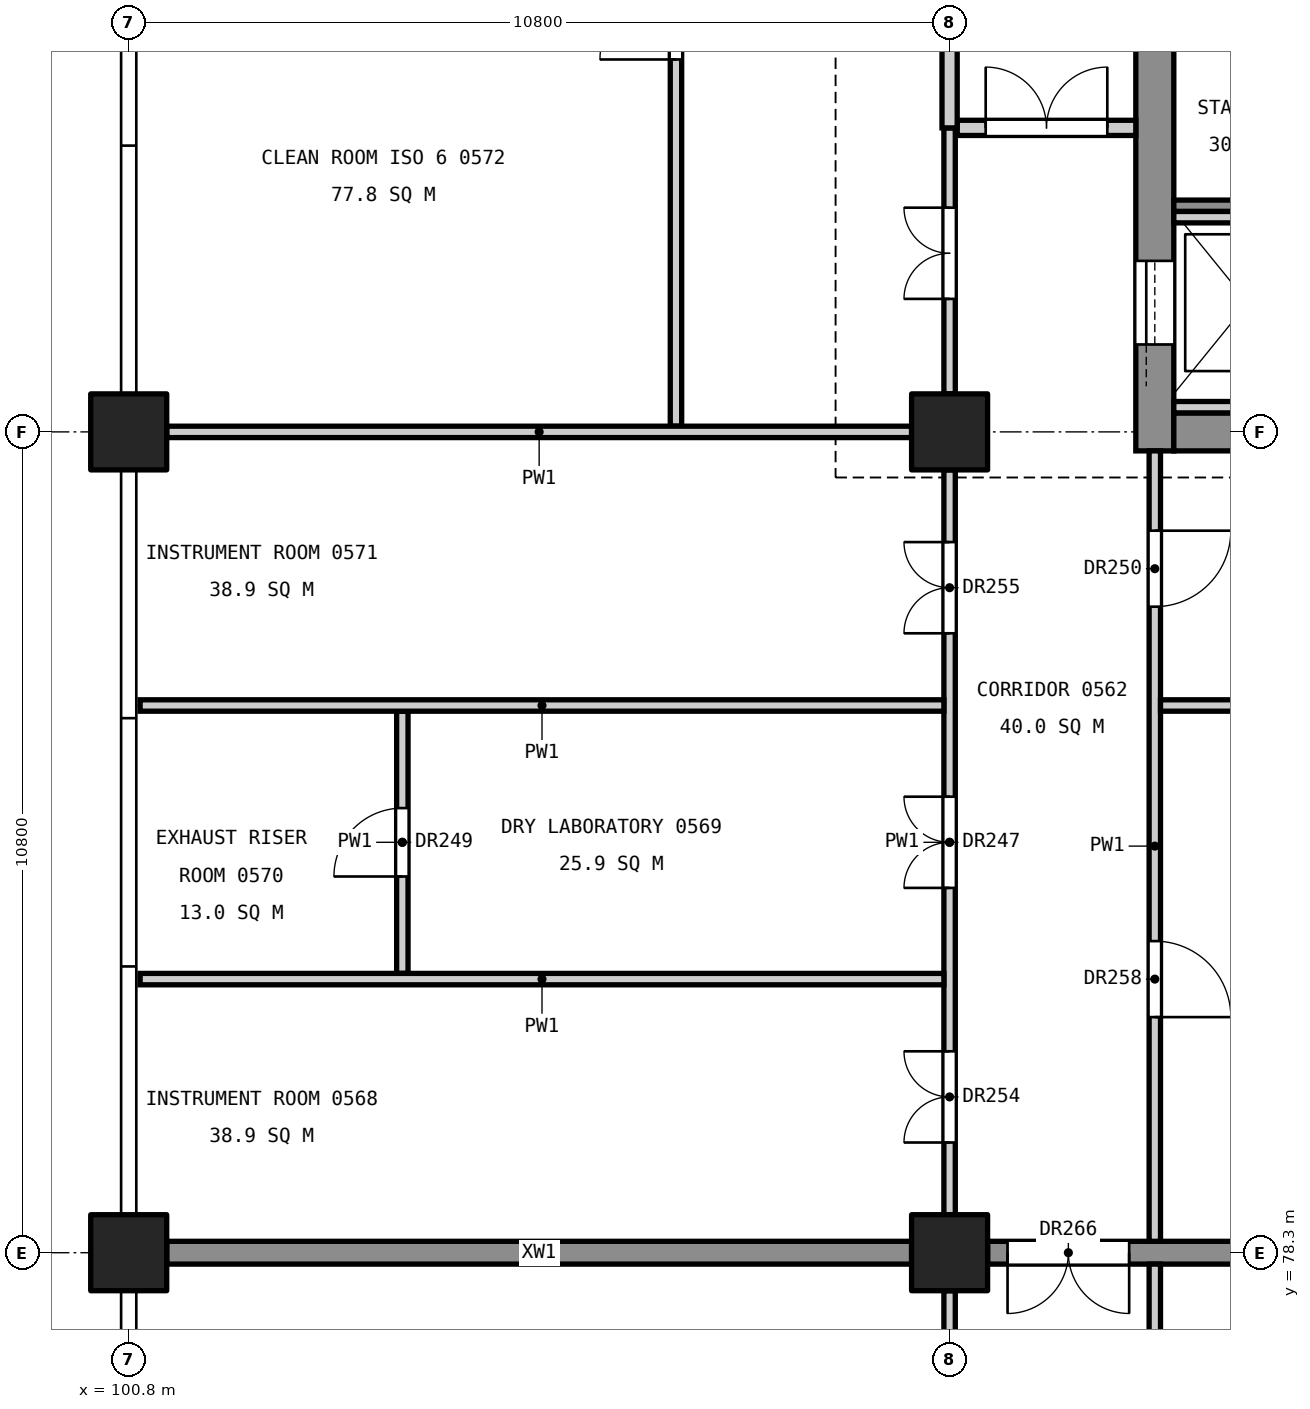
"""IFC4 building model, lengths in metres.
Left out: names, types, materials, properties, quantities, classifications, styles, units other than length and angle.
Written with IfcOpenShell. Run it as: python <this file> out.ifc"""

import sys

from ifc_helpers import new_model, si_unit, direction, frame, frame_2d, origin, origin_2d, place, context, subcontext, project, spatial, rectangle, extrude, element, fill, save


model = new_model("IFC4")
c1 = context("Model", 3, precision=1e-05, world=origin(), true_north=direction((0.0, 1.0)))
c2 = subcontext(c1, "Body", "Model", "MODEL_VIEW")
j1 = project(units=[si_unit("LENGTHUNIT", "METRE"), si_unit("PLANEANGLEUNIT", "RADIAN")], contexts=[c1])
p1 = place(None, origin())
s1 = spatial("IfcSite", under=j1, at=p1, CompositionType="ELEMENT")
p2 = place(p1, origin())
s2 = spatial("IfcBuilding", under=s1, at=p2, CompositionType="ELEMENT")
p3 = place(p2, frame((0.0, 0.0, 27.0)))
s3 = spatial("IfcBuildingStorey", under=s2, at=p3, CompositionType="ELEMENT", Elevation=27.0)
for number, where, z_axis, x_axis in (
    (1, (111.6, 78.3, 0.0), (0.0, 0.0, 1.0), (1.0, 0.0, 0.0)),
    (2, (111.6, 89.1, 0.0), (0.0, 0.0, 1.0), (1.0, 0.0, 0.0)),
    (3, (100.8, 78.3, 0.0), (0.0, 0.0, 1.0), (1.0, 0.0, 0.0)),
    (4, (100.8, 89.1, 0.0), (0.0, 0.0, 1.0), (1.0, 0.0, 0.0)),
):
    element("IfcColumn", number, at=place(p3, frame(where, z_axis=z_axis, x_axis=x_axis)), inside=s3, PredefinedType="COLUMN", context=c2, shape_type="SweptSolid", body=[
        extrude(rectangle(XDim=1.0, YDim=1.0, at=origin_2d()), origin(), (0.0, 0.0, 1.0), 4.8),
    ])
p4 = place(p3, frame((114.3, 88.85, 0.0), z_axis=(0.0, 0.0, 1.0), x_axis=(0.0, 1.0, 0.0)))
e5 = element("IfcWall", 5, at=p4, inside=s3, PredefinedType="SHEAR", context=c2, shape_type="SweptSolid", body=[
    extrude(rectangle(XDim=11.3, YDim=0.5, at=frame_2d((5.65, 0.0))), origin(), (0.0, 0.0, 1.0), 4.55),
])
p5 = place(p4, frame((9.35, 0.0, 0.0)))
e6 = element("IfcOpeningElement", 6, at=p5, cuts=e5, PredefinedType="OPENING", context=c2, shape_type="SweptSolid", body=[
    extrude(rectangle(XDim=1.4, YDim=2.1, at=frame_2d((0.7, 1.05))), frame((0.0, 0.26, 0.0), z_axis=(0.0, -1.0, 0.0), x_axis=(1.0, 0.0, 0.0)), (0.0, 0.0, 1.0), 0.52),
])
p6 = place(p4, frame((1.4, 0.0, 0.0)))
e7 = element("IfcOpeningElement", 7, at=p6, cuts=e5, PredefinedType="OPENING", context=c2, shape_type="SweptSolid", body=[
    extrude(rectangle(XDim=1.1, YDim=2.1, at=frame_2d((0.55, 1.05))), frame((0.0, 0.26, 0.0), z_axis=(0.0, -1.0, 0.0), x_axis=(1.0, 0.0, 0.0)), (0.0, 0.0, 1.0), 0.52),
])
p7 = place(p3, frame((118.55, 89.1, 0.0), z_axis=(0.0, 0.0, 1.0), x_axis=(-1.0, 0.0, 0.0)))
e8 = element("IfcWall", 8, at=p7, inside=s3, PredefinedType="SHEAR", context=c2, shape_type="SweptSolid", body=[
    extrude(rectangle(XDim=4.0, YDim=0.5, at=frame_2d((2.0, 0.0))), origin(), (0.0, 0.0, 1.0), 4.55),
])
p8 = place(p3, frame((118.3, 78.3, 0.0), z_axis=(0.0, 0.0, 1.0), x_axis=(-1.0, 0.0, 0.0)))
e9 = element("IfcWall", 9, at=p8, inside=s3, PredefinedType="SHEAR", context=c2, shape_type="SweptSolid", body=[
    extrude(rectangle(XDim=6.2, YDim=0.3, at=frame_2d((3.1, 0.0))), origin(), (0.0, 0.0, 1.0), 4.55),
])
p9 = place(p8, frame((4.337, 0.0, 0.0)))
e10 = element("IfcOpeningElement", 10, at=p9, cuts=e9, PredefinedType="OPENING", context=c2, shape_type="SweptSolid", body=[
    extrude(rectangle(XDim=1.6, YDim=2.1, at=frame_2d((0.8, 1.05))), frame((0.0, 0.16, 0.0), z_axis=(0.0, -1.0, 0.0), x_axis=(1.0, 0.0, 0.0)), (0.0, 0.0, 1.0), 0.32),
])
p10 = place(p3, frame((111.1, 78.3, 0.0), z_axis=(0.0, 0.0, 1.0), x_axis=(-1.0, 0.0, 0.0)))
e11 = element("IfcWall", 11, at=p10, inside=s3, PredefinedType="SHEAR", context=c2, shape_type="SweptSolid", body=[
    extrude(rectangle(XDim=9.8, YDim=0.3, at=frame_2d((4.9, 0.0))), origin(), (0.0, 0.0, 1.0), 4.55),
])
p11 = place(p3, frame((118.55, 92.075, 0.0), z_axis=(0.0, 0.0, 1.0), x_axis=(-1.0, 0.0, 0.0)))
e12 = element("IfcWall", 12, at=p11, inside=s3, PredefinedType="SOLIDWALL", context=c2, shape_type="SweptSolid", body=[
    extrude(rectangle(XDim=4.0, YDim=0.15, at=frame_2d((2.0, 0.0))), origin(), (0.0, 0.0, 1.0), 4.55),
])
for number, where, z_axis, x_axis in (
    (13, (116.35, 91.925, 0.0), (0.0, 0.0, 1.0), (-1.0, 0.0, 0.0)),
    (14, (116.35, 89.425, 0.0), (0.0, 0.0, 1.0), (-1.0, 0.0, 0.0)),
):
    element("IfcWall", number, at=place(p3, frame(where, z_axis=z_axis, x_axis=x_axis)), inside=s3, PredefinedType="SOLIDWALL", context=c2, shape_type="SweptSolid", body=[
        extrude(rectangle(XDim=1.8, YDim=0.15, at=frame_2d((0.9, 0.0))), origin(), (0.0, 0.0, 1.0), 4.8),
    ])
p12 = place(p3, frame((114.3, 74.95, 0.0), z_axis=(0.0, 0.0, 1.0), x_axis=(0.0, 1.0, 0.0)))
e15 = element("IfcWall", 15, at=p12, inside=s3, PredefinedType="PARTITIONING", context=c2, shape_type="SweptSolid", body=[
    extrude(rectangle(XDim=3.2, YDim=0.15, at=frame_2d((1.6, 0.0))), origin(), (0.0, 0.0, 1.0), 3.55),
])
p13 = place(p12, frame((1.05, 0.0, 0.0)))
e16 = element("IfcOpeningElement", 16, at=p13, cuts=e15, PredefinedType="OPENING", context=c2, shape_type="SweptSolid", body=[
    extrude(rectangle(XDim=1.0, YDim=2.1, at=frame_2d((0.5, 1.05))), frame((0.0, 0.085, 0.0), z_axis=(0.0, -1.0, 0.0), x_axis=(1.0, 0.0, 0.0)), (0.0, 0.0, 1.0), 0.17),
])
p14 = place(p3, frame((114.3, 78.45, 0.0), z_axis=(0.0, 0.0, 1.0), x_axis=(0.0, 1.0, 0.0)))
e17 = element("IfcWall", 17, at=p14, inside=s3, PredefinedType="PARTITIONING", context=c2, shape_type="SweptSolid", body=[
    extrude(rectangle(XDim=10.4, YDim=0.15, at=frame_2d((5.2, 0.0))), origin(), (0.0, 0.0, 1.0), 3.55),
])
p15 = place(p14, frame((8.35, 0.0, 0.0)))
e18 = element("IfcOpeningElement", 18, at=p15, cuts=e17, PredefinedType="OPENING", context=c2, shape_type="SweptSolid", body=[
    extrude(rectangle(XDim=1.0, YDim=2.1, at=frame_2d((0.5, 1.05))), frame((0.0, 0.085, 0.0), z_axis=(0.0, -1.0, 0.0), x_axis=(1.0, 0.0, 0.0)), (0.0, 0.0, 1.0), 0.17),
])
p16 = place(p14, frame((2.95, 0.0, 0.0)))
e19 = element("IfcOpeningElement", 19, at=p16, cuts=e17, PredefinedType="OPENING", context=c2, shape_type="SweptSolid", body=[
    extrude(rectangle(XDim=1.0, YDim=2.1, at=frame_2d((0.5, 1.05))), frame((0.0, 0.085, 0.0), z_axis=(0.0, -1.0, 0.0), x_axis=(1.0, 0.0, 0.0)), (0.0, 0.0, 1.0), 0.17),
])
p17 = place(p3, frame((118.65, 85.5, 0.0), z_axis=(0.0, 0.0, 1.0), x_axis=(-1.0, 0.0, 0.0)))
e20 = element("IfcWall", 20, at=p17, inside=s3, PredefinedType="PARTITIONING", context=c2, shape_type="SweptSolid", body=[
    extrude(rectangle(XDim=4.275, YDim=0.15, at=frame_2d((2.137, 0.0))), origin(), (0.0, 0.0, 1.0), 3.85),
])
p18 = place(p3, frame((114.05, 93.1, 0.0), z_axis=(0.0, 0.0, 1.0), x_axis=(-1.0, 0.0, 0.0)))
e21 = element("IfcWall", 21, at=p18, inside=s3, PredefinedType="PARTITIONING", context=c2, shape_type="SweptSolid", body=[
    extrude(rectangle(XDim=2.35, YDim=0.2, at=frame_2d((1.175, 0.0))), origin(), (0.0, 0.0, 1.0), 3.55),
])
p19 = place(p18, frame((0.375, 0.0, 0.0)))
e22 = element("IfcOpeningElement", 22, at=p19, cuts=e21, PredefinedType="OPENING", context=c2, shape_type="SweptSolid", body=[
    extrude(rectangle(XDim=1.6, YDim=2.1, at=frame_2d((0.8, 1.05))), frame((0.0, 0.11, 0.0), z_axis=(0.0, -1.0, 0.0), x_axis=(1.0, 0.0, 0.0)), (0.0, 0.0, 1.0), 0.22),
])
p20 = place(p3, frame((111.6, 70.8, 0.0), z_axis=(0.0, 0.0, 1.0), x_axis=(0.0, 1.0, 0.0)))
e23 = element("IfcWall", 23, at=p20, inside=s3, PredefinedType="PARTITIONING", context=c2, shape_type="SweptSolid", body=[
    extrude(rectangle(XDim=7.0, YDim=0.15, at=frame_2d((3.5, 0.0))), origin(), (0.0, 0.0, 1.0), 3.55),
])
p21 = place(p20, frame((2.9, 0.0, 0.0)))
e24 = element("IfcOpeningElement", 24, at=p21, cuts=e23, PredefinedType="OPENING", context=c2, shape_type="SweptSolid", body=[
    extrude(rectangle(XDim=1.2, YDim=2.1, at=frame_2d((0.6, 1.05))), frame((0.0, 0.085, 0.0), z_axis=(0.0, -1.0, 0.0), x_axis=(1.0, 0.0, 0.0)), (0.0, 0.0, 1.0), 0.17),
])
p22 = place(p3, frame((111.6, 78.8, 0.0), z_axis=(0.0, 0.0, 1.0), x_axis=(0.0, 1.0, 0.0)))
e25 = element("IfcWall", 25, at=p22, inside=s3, PredefinedType="PARTITIONING", context=c2, shape_type="SweptSolid", body=[
    extrude(rectangle(XDim=9.8, YDim=0.15, at=frame_2d((4.9, 0.0))), origin(), (0.0, 0.0, 1.0), 3.55),
])
p23 = place(p22, frame((4.3, 0.0, 0.0)))
e26 = element("IfcOpeningElement", 26, at=p23, cuts=e25, PredefinedType="OPENING", context=c2, shape_type="SweptSolid", body=[
    extrude(rectangle(XDim=1.2, YDim=2.1, at=frame_2d((0.6, 1.05))), frame((0.0, 0.085, 0.0), z_axis=(0.0, -1.0, 0.0), x_axis=(1.0, 0.0, 0.0)), (0.0, 0.0, 1.0), 0.17),
])
p24 = place(p22, frame((0.95, 0.0, 0.0)))
e27 = element("IfcOpeningElement", 27, at=p24, cuts=e25, PredefinedType="OPENING", context=c2, shape_type="SweptSolid", body=[
    extrude(rectangle(XDim=1.2, YDim=2.1, at=frame_2d((0.6, 1.05))), frame((0.0, 0.085, 0.0), z_axis=(0.0, -1.0, 0.0), x_axis=(1.0, 0.0, 0.0)), (0.0, 0.0, 1.0), 0.17),
])
p25 = place(p22, frame((7.65, 0.0, 0.0)))
e28 = element("IfcOpeningElement", 28, at=p25, cuts=e25, PredefinedType="OPENING", context=c2, shape_type="SweptSolid", body=[
    extrude(rectangle(XDim=1.2, YDim=2.1, at=frame_2d((0.6, 1.05))), frame((0.0, 0.085, 0.0), z_axis=(0.0, -1.0, 0.0), x_axis=(1.0, 0.0, 0.0)), (0.0, 0.0, 1.0), 0.17),
])
p26 = place(p3, frame((111.6, 89.6, 0.0), z_axis=(0.0, 0.0, 1.0), x_axis=(0.0, 1.0, 0.0)))
e29 = element("IfcWall", 29, at=p26, inside=s3, PredefinedType="PARTITIONING", context=c2, shape_type="SweptSolid", body=[
    extrude(rectangle(XDim=3.5, YDim=0.15, at=frame_2d((1.75, 0.0))), origin(), (0.0, 0.0, 1.0), 3.55),
])
p27 = place(p26, frame((1.25, 0.0, 0.0)))
e30 = element("IfcOpeningElement", 30, at=p27, cuts=e29, PredefinedType="OPENING", context=c2, shape_type="SweptSolid", body=[
    extrude(rectangle(XDim=1.2, YDim=2.1, at=frame_2d((0.6, 1.05))), frame((0.0, 0.085, 0.0), z_axis=(0.0, -1.0, 0.0), x_axis=(1.0, 0.0, 0.0)), (0.0, 0.0, 1.0), 0.17),
])
p28 = place(p3, frame((111.6, 93.1, 0.0), z_axis=(0.0, 0.0, 1.0), x_axis=(0.0, 1.0, 0.0)))
e31 = element("IfcWall", 31, at=p28, inside=s3, PredefinedType="PARTITIONING", context=c2, shape_type="SweptSolid", body=[
    extrude(rectangle(XDim=6.3, YDim=0.2, at=frame_2d((3.15, 0.0))), origin(), (0.0, 0.0, 1.0), 3.55),
])
p29 = place(p3, frame((104.4, 81.975, 0.0), z_axis=(0.0, 0.0, 1.0), x_axis=(0.0, 1.0, 0.0)))
e32 = element("IfcWall", 32, at=p29, inside=s3, PredefinedType="PARTITIONING", context=c2, shape_type="SweptSolid", body=[
    extrude(rectangle(XDim=3.45, YDim=0.15, at=frame_2d((1.725, 0.0))), origin(), (0.0, 0.0, 1.0), 3.55),
])
p30 = place(p29, frame((1.275, 0.0, 0.0)))
e33 = element("IfcOpeningElement", 33, at=p30, cuts=e32, PredefinedType="OPENING", context=c2, shape_type="SweptSolid", body=[
    extrude(rectangle(XDim=0.9, YDim=2.1, at=frame_2d((0.45, 1.05))), frame((0.0, 0.085, 0.0), z_axis=(0.0, -1.0, 0.0), x_axis=(1.0, 0.0, 0.0)), (0.0, 0.0, 1.0), 0.17),
])
p31 = place(p3, frame((108.0, 89.175, 0.0), z_axis=(0.0, 0.0, 1.0), x_axis=(0.0, 1.0, 0.0)))
e34 = element("IfcWall", 34, at=p31, inside=s3, PredefinedType="PARTITIONING", context=c2, shape_type="SweptSolid", body=[
    extrude(rectangle(XDim=10.575, YDim=0.15, at=frame_2d((5.288, 0.0))), origin(), (0.0, 0.0, 1.0), 3.55),
])
p32 = place(p31, frame((4.825, 0.0, 0.0)))
e35 = element("IfcOpeningElement", 35, at=p32, cuts=e34, PredefinedType="OPENING", context=c2, shape_type="SweptSolid", body=[
    extrude(rectangle(XDim=1.0, YDim=2.1, at=frame_2d((0.5, 1.05))), frame((0.0, 0.085, 0.0), z_axis=(0.0, -1.0, 0.0), x_axis=(1.0, 0.0, 0.0)), (0.0, 0.0, 1.0), 0.17),
])
for number, where, z_axis, x_axis in (
    (36, (111.525, 81.9, 0.0), (0.0, 0.0, 1.0), (-1.0, 0.0, 0.0)),
    (37, (111.525, 85.5, 0.0), (0.0, 0.0, 1.0), (-1.0, 0.0, 0.0)),
):
    element("IfcWall", number, at=place(p3, frame(where, z_axis=z_axis, x_axis=x_axis)), inside=s3, PredefinedType="PARTITIONING", context=c2, shape_type="SweptSolid", body=[
        extrude(rectangle(XDim=10.575, YDim=0.15, at=frame_2d((5.288, 0.0))), origin(), (0.0, 0.0, 1.0), 3.85),
    ])
p33 = place(p3, frame((111.1, 89.1, 0.0), z_axis=(0.0, 0.0, 1.0), x_axis=(-1.0, 0.0, 0.0)))
e38 = element("IfcWall", 38, at=p33, inside=s3, PredefinedType="PARTITIONING", context=c2, shape_type="SweptSolid", body=[
    extrude(rectangle(XDim=9.8, YDim=0.15, at=frame_2d((4.9, 0.0))), origin(), (0.0, 0.0, 1.0), 3.85),
])
p34 = place(p6, origin())
e39 = element("IfcDoor", 39, at=p34, inside=s3, OperationType="SLIDING_TO_LEFT", PredefinedType="DOOR", context=c2, shape_type="SweptSolid", body=[
    extrude(rectangle(XDim=1.1, YDim=2.1, at=frame_2d((0.55, 1.05))), frame((0.0, 0.025, 0.0), z_axis=(0.0, -1.0, 0.0), x_axis=(1.0, 0.0, 0.0)), (0.0, 0.0, 1.0), 0.05),
])
fill(e7, e39)
p35 = place(p32, origin())
e40 = element("IfcDoor", 40, at=p35, inside=s3, OperationType="SINGLE_SWING_LEFT", PredefinedType="DOOR", context=c2, shape_type="SweptSolid", body=[
    extrude(rectangle(XDim=1.0, YDim=2.1, at=frame_2d((0.5, 1.05))), frame((0.0, 0.025, 0.0), z_axis=(0.0, -1.0, 0.0), x_axis=(1.0, 0.0, 0.0)), (0.0, 0.0, 1.0), 0.05),
])
fill(e35, e40)
p36 = place(p23, origin())
e41 = element("IfcDoor", 41, at=p36, inside=s3, OperationType="DOUBLE_DOOR_SINGLE_SWING", PredefinedType="DOOR", context=c2, shape_type="SweptSolid", body=[
    extrude(rectangle(XDim=1.2, YDim=2.1, at=frame_2d((0.6, 1.05))), frame((0.0, 0.025, 0.0), z_axis=(0.0, -1.0, 0.0), x_axis=(1.0, 0.0, 0.0)), (0.0, 0.0, 1.0), 0.05),
])
fill(e26, e41)
p37 = place(p30, origin())
e42 = element("IfcDoor", 42, at=p37, inside=s3, OperationType="SINGLE_SWING_LEFT", PredefinedType="DOOR", context=c2, shape_type="SweptSolid", body=[
    extrude(rectangle(XDim=0.9, YDim=2.1, at=frame_2d((0.45, 1.05))), frame((0.0, 0.025, 0.0), z_axis=(0.0, -1.0, 0.0), x_axis=(1.0, 0.0, 0.0)), (0.0, 0.0, 1.0), 0.05),
])
fill(e33, e42)
p38 = place(p15, frame((1.0, 0.0, 0.0), z_axis=(0.0, 0.0, 1.0), x_axis=(-1.0, 0.0, 0.0)))
e43 = element("IfcDoor", 43, at=p38, inside=s3, OperationType="SINGLE_SWING_LEFT", PredefinedType="DOOR", context=c2, shape_type="SweptSolid", body=[
    extrude(rectangle(XDim=1.0, YDim=2.1, at=frame_2d((0.5, 1.05))), frame((0.0, 0.025, 0.0), z_axis=(0.0, -1.0, 0.0), x_axis=(1.0, 0.0, 0.0)), (0.0, 0.0, 1.0), 0.05),
])
fill(e18, e43)
p39 = place(p27, origin())
e44 = element("IfcDoor", 44, at=p39, inside=s3, OperationType="DOUBLE_DOOR_SINGLE_SWING", PredefinedType="DOOR", context=c2, shape_type="SweptSolid", body=[
    extrude(rectangle(XDim=1.2, YDim=2.1, at=frame_2d((0.6, 1.05))), frame((0.0, 0.025, 0.0), z_axis=(0.0, -1.0, 0.0), x_axis=(1.0, 0.0, 0.0)), (0.0, 0.0, 1.0), 0.05),
])
fill(e30, e44)
p40 = place(p24, origin())
e45 = element("IfcDoor", 45, at=p40, inside=s3, OperationType="DOUBLE_DOOR_SINGLE_SWING", PredefinedType="DOOR", context=c2, shape_type="SweptSolid", body=[
    extrude(rectangle(XDim=1.2, YDim=2.1, at=frame_2d((0.6, 1.05))), frame((0.0, 0.025, 0.0), z_axis=(0.0, -1.0, 0.0), x_axis=(1.0, 0.0, 0.0)), (0.0, 0.0, 1.0), 0.05),
])
fill(e27, e45)
p41 = place(p25, origin())
e46 = element("IfcDoor", 46, at=p41, inside=s3, OperationType="DOUBLE_DOOR_SINGLE_SWING", PredefinedType="DOOR", context=c2, shape_type="SweptSolid", body=[
    extrude(rectangle(XDim=1.2, YDim=2.1, at=frame_2d((0.6, 1.05))), frame((0.0, 0.025, 0.0), z_axis=(0.0, -1.0, 0.0), x_axis=(1.0, 0.0, 0.0)), (0.0, 0.0, 1.0), 0.05),
])
fill(e28, e46)
p42 = place(p16, frame((1.0, 0.0, 0.0), z_axis=(0.0, 0.0, 1.0), x_axis=(-1.0, 0.0, 0.0)))
e47 = element("IfcDoor", 47, at=p42, inside=s3, OperationType="SINGLE_SWING_RIGHT", PredefinedType="DOOR", context=c2, shape_type="SweptSolid", body=[
    extrude(rectangle(XDim=1.0, YDim=2.1, at=frame_2d((0.5, 1.05))), frame((0.0, 0.025, 0.0), z_axis=(0.0, -1.0, 0.0), x_axis=(1.0, 0.0, 0.0)), (0.0, 0.0, 1.0), 0.05),
])
fill(e19, e47)
p43 = place(p19, frame((1.6, 0.0, 0.0), z_axis=(0.0, 0.0, 1.0), x_axis=(-1.0, 0.0, 0.0)))
e48 = element("IfcDoor", 48, at=p43, inside=s3, OperationType="DOUBLE_DOOR_SINGLE_SWING", PredefinedType="DOOR", context=c2, shape_type="SweptSolid", body=[
    extrude(rectangle(XDim=1.6, YDim=2.1, at=frame_2d((0.8, 1.05))), frame((0.0, 0.025, 0.0), z_axis=(0.0, -1.0, 0.0), x_axis=(1.0, 0.0, 0.0)), (0.0, 0.0, 1.0), 0.05),
])
fill(e22, e48)
p44 = place(p9, origin())
e49 = element("IfcDoor", 49, at=p44, inside=s3, OperationType="DOUBLE_DOOR_SINGLE_SWING", PredefinedType="DOOR", context=c2, shape_type="SweptSolid", body=[
    extrude(rectangle(XDim=1.6, YDim=2.1, at=frame_2d((0.8, 1.05))), frame((0.0, 0.025, 0.0), z_axis=(0.0, -1.0, 0.0), x_axis=(1.0, 0.0, 0.0)), (0.0, 0.0, 1.0), 0.05),
])
fill(e10, e49)
save(model, sys.argv[1])
